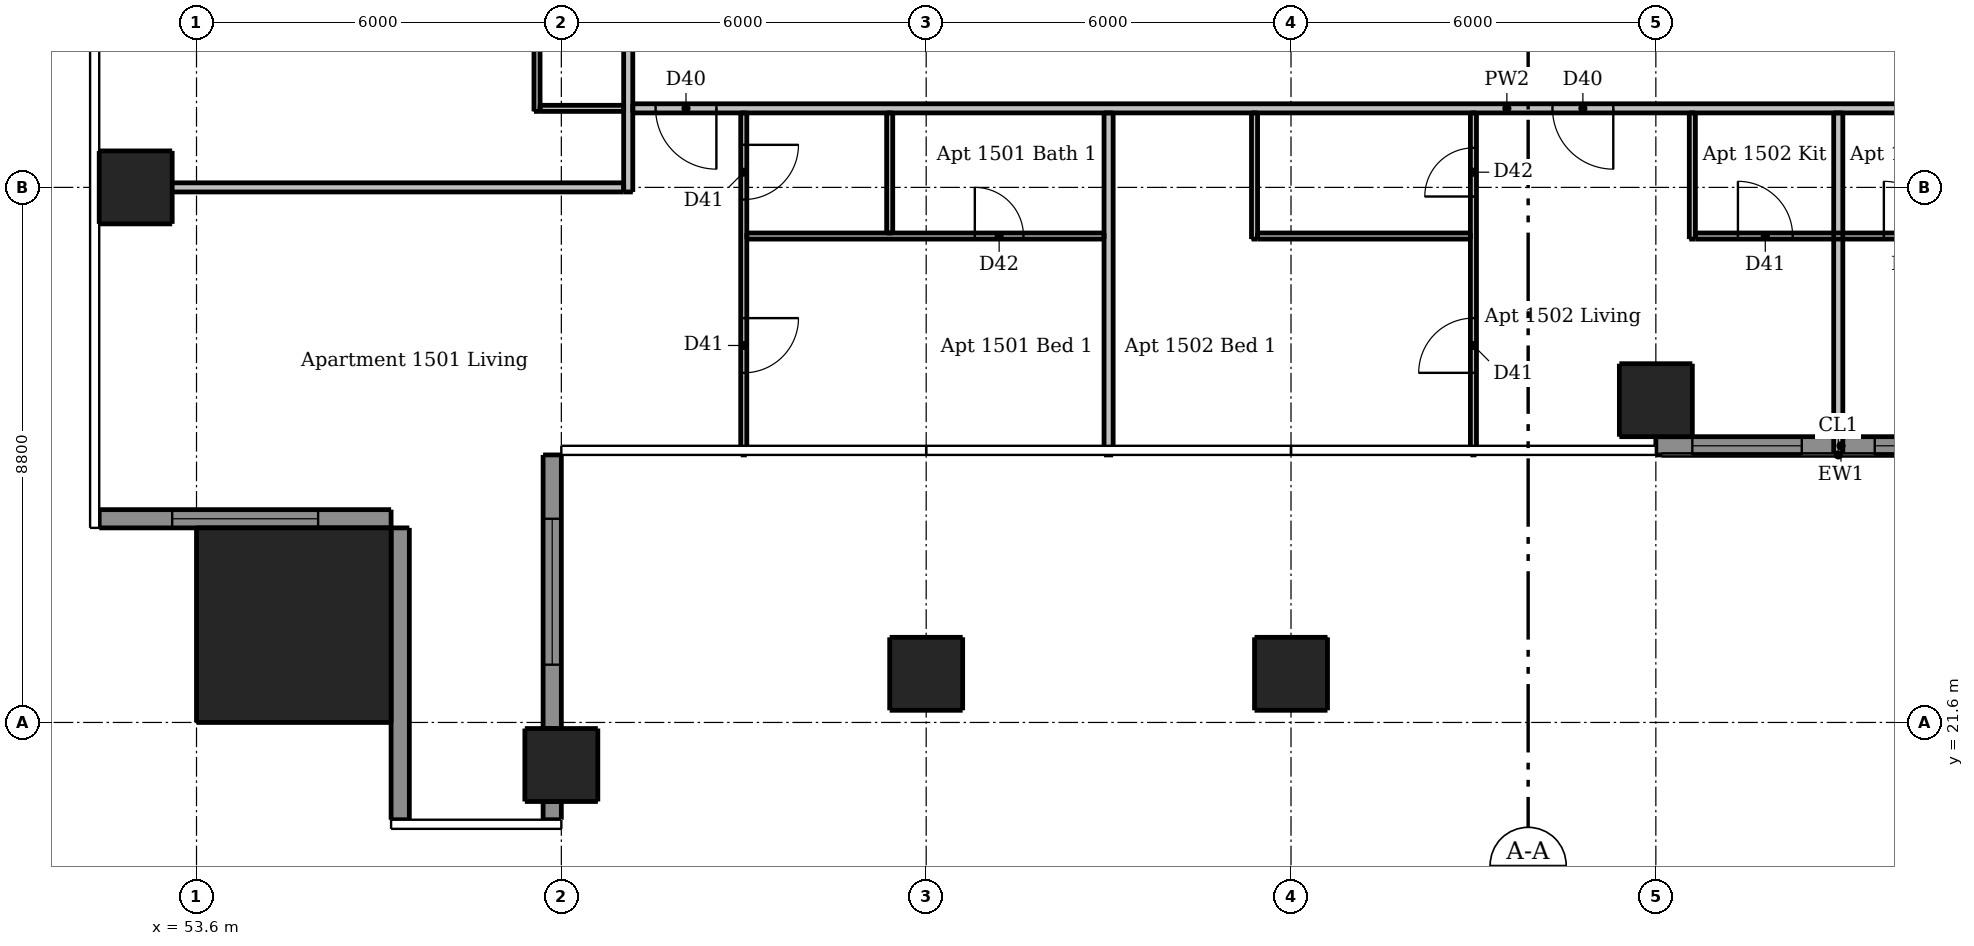
"""IFC4 building model, lengths in metres.
Left out: names, types, materials, properties, quantities, classifications, styles, units other than length and angle.
Written with IfcOpenShell. Run it as: python <this file> out.ifc"""

import sys

from ifc_helpers import new_model, si_unit, direction, frame, frame_2d, origin, origin_2d, place, context, subcontext, project, spatial, rectangle, extrude, element, fill, save


model = new_model("IFC4")
c1 = context("Model", 3, precision=1e-05, world=origin(), true_north=direction((0.0, 1.0)))
c2 = subcontext(c1, "Body", "Model", "MODEL_VIEW")
j1 = project(units=[si_unit("LENGTHUNIT", "METRE"), si_unit("PLANEANGLEUNIT", "RADIAN")], contexts=[c1])
p1 = place(None, origin())
s1 = spatial("IfcSite", under=j1, at=p1, CompositionType="ELEMENT")
p2 = place(p1, origin())
s2 = spatial("IfcBuilding", under=s1, at=p2, CompositionType="ELEMENT")
p3 = place(p2, frame((0.0, 0.0, 56.5)))
s3 = spatial("IfcBuildingStorey", under=s2, at=p3, CompositionType="ELEMENT", Elevation=56.5)
for number, where, z_axis, x_axis in (
    (1, (59.6, 20.9, 0.0), (0.0, 0.0, 1.0), (1.0, 0.0, 0.0)),
    (2, (65.6, 22.4, 0.0), (0.0, 0.0, 1.0), (1.0, 0.0, 0.0)),
    (3, (71.6, 22.4, 0.0), (0.0, 0.0, 1.0), (1.0, 0.0, 0.0)),
    (4, (77.6, 26.9, 0.0), (0.0, 0.0, 1.0), (1.0, 0.0, 0.0)),
    (5, (52.6, 30.4, 0.0), (0.0, 0.0, 1.0), (1.0, 0.0, 0.0)),
):
    element("IfcColumn", number, at=place(p3, frame(where, z_axis=z_axis, x_axis=x_axis)), inside=s3, PredefinedType="COLUMN", context=c2, shape_type="SweptSolid", body=[
        extrude(rectangle(XDim=1.2, YDim=1.2, at=origin_2d()), origin(), (0.0, 0.0, 1.0), 3.05),
    ])
p4 = place(p3, frame((55.2, 23.2, 0.0), z_axis=(0.0, 0.0, 1.0), x_axis=(1.0, 0.0, 0.0)))
e6 = element("IfcColumn", 6, at=p4, inside=s3, PredefinedType="COLUMN", context=c2, shape_type="SweptSolid", body=[
    extrude(rectangle(XDim=3.2, YDim=3.2, at=origin_2d()), origin(), (0.0, 0.0, 1.0), 3.3),
])
p5 = place(p3, frame((59.45, 20.0, 0.0), z_axis=(0.0, 0.0, 1.0), x_axis=(0.0, 1.0, 0.0)))
e7 = element("IfcWall", 7, at=p5, inside=s3, PredefinedType="SOLIDWALL", context=c2, shape_type="SweptSolid", body=[
    extrude(rectangle(XDim=0.3, YDim=0.3, at=frame_2d((0.15, 0.0))), origin(), (0.0, 0.0, 1.0), 3.05),
])
p6 = place(p3, frame((59.45, 21.5, 0.0), z_axis=(0.0, 0.0, 1.0), x_axis=(0.0, 1.0, 0.0)))
e8 = element("IfcWall", 8, at=p6, inside=s3, PredefinedType="SOLIDWALL", context=c2, shape_type="SweptSolid", body=[
    extrude(rectangle(XDim=4.5, YDim=0.3, at=frame_2d((2.25, 0.0))), origin(), (0.0, 0.0, 1.0), 3.05),
])
p7 = place(p6, frame((1.05, 0.0, 0.15)))
e9 = element("IfcOpeningElement", 9, at=p7, cuts=e8, PredefinedType="OPENING", context=c2, shape_type="SweptSolid", body=[
    extrude(rectangle(XDim=2.4, YDim=2.1, at=frame_2d((1.2, 1.05))), frame((0.0, 0.16, 0.0), z_axis=(0.0, -1.0, 0.0), x_axis=(1.0, 0.0, 0.0)), (0.0, 0.0, 1.0), 0.32),
])
p8 = place(p3, frame((52.0, 24.95, 0.0), z_axis=(0.0, 0.0, 1.0), x_axis=(1.0, 0.0, 0.0)))
e10 = element("IfcWall", 10, at=p8, inside=s3, PredefinedType="SOLIDWALL", context=c2, shape_type="SweptSolid", body=[
    extrude(rectangle(XDim=4.8, YDim=0.3, at=frame_2d((2.4, 0.0))), origin(), (0.0, 0.0, 1.0), 3.05),
])
p9 = place(p8, frame((1.2, 0.0, 0.15)))
e11 = element("IfcOpeningElement", 11, at=p9, cuts=e10, PredefinedType="OPENING", context=c2, shape_type="SweptSolid", body=[
    extrude(rectangle(XDim=2.4, YDim=2.1, at=frame_2d((1.2, 1.05))), frame((0.0, 0.16, 0.0), z_axis=(0.0, -1.0, 0.0), x_axis=(1.0, 0.0, 0.0)), (0.0, 0.0, 1.0), 0.32),
])
p10 = place(p3, frame((56.95, 24.8, 0.0), z_axis=(0.0, 0.0, 1.0), x_axis=(0.0, -1.0, 0.0)))
e12 = element("IfcWall", 12, at=p10, inside=s3, PredefinedType="SOLIDWALL", context=c2, shape_type="SweptSolid", body=[
    extrude(rectangle(XDim=4.8, YDim=0.3, at=frame_2d((2.4, 0.0))), origin(), (0.0, 0.0, 1.0), 3.05),
])
p11 = place(p3, frame((77.6, 26.15, 0.0), z_axis=(0.0, 0.0, 1.0), x_axis=(1.0, 0.0, 0.0)))
e13 = element("IfcWall", 13, at=p11, inside=s3, PredefinedType="SOLIDWALL", context=c2, shape_type="SweptSolid", body=[
    extrude(rectangle(XDim=6.09, YDim=0.3, at=frame_2d((3.045, 0.0))), origin(), (0.0, 0.0, 1.0), 3.05),
])
p12 = place(p11, frame((0.6, 0.0, 0.15)))
e14 = element("IfcOpeningElement", 14, at=p12, cuts=e13, PredefinedType="OPENING", context=c2, shape_type="SweptSolid", body=[
    extrude(rectangle(XDim=1.8, YDim=2.1, at=frame_2d((0.9, 1.05))), frame((0.0, 0.16, 0.0), z_axis=(0.0, -1.0, 0.0), x_axis=(1.0, 0.0, 0.0)), (0.0, 0.0, 1.0), 0.32),
])
p13 = place(p11, frame((3.6, 0.0, 0.15)))
e15 = element("IfcOpeningElement", 15, at=p13, cuts=e13, PredefinedType="OPENING", context=c2, shape_type="SweptSolid", body=[
    extrude(rectangle(XDim=1.8, YDim=2.1, at=frame_2d((0.9, 1.05))), frame((0.0, 0.16, 0.0), z_axis=(0.0, -1.0, 0.0), x_axis=(1.0, 0.0, 0.0)), (0.0, 0.0, 1.0), 0.32),
])
p14 = place(p3, frame((59.2, 31.65, 0.0), z_axis=(0.0, 0.0, 1.0), x_axis=(0.0, 1.0, 0.0)))
e16 = element("IfcWall", 16, at=p14, inside=s3, PredefinedType="PARTITIONING", context=c2, shape_type="SweptSolid", body=[
    extrude(rectangle(XDim=16.675, YDim=0.1, at=frame_2d((8.337, 0.0))), origin(), (0.0, 0.0, 1.0), 3.05),
])
p15 = place(p14, frame((3.45, 0.0, 0.0)))
e17 = element("IfcOpeningElement", 17, at=p15, cuts=e16, PredefinedType="OPENING", context=c2, shape_type="SweptSolid", body=[
    extrude(rectangle(XDim=0.9, YDim=2.1, at=frame_2d((0.45, 1.05))), frame((0.0, 0.06, 0.0), z_axis=(0.0, -1.0, 0.0), x_axis=(1.0, 0.0, 0.0)), (0.0, 0.0, 1.0), 0.12),
])
p16 = place(p14, frame((8.8, 0.0, 0.0)))
e18 = element("IfcOpeningElement", 18, at=p16, cuts=e16, PredefinedType="OPENING", context=c2, shape_type="SweptSolid", body=[
    extrude(rectangle(XDim=0.9, YDim=2.1, at=frame_2d((0.45, 1.05))), frame((0.0, 0.06, 0.0), z_axis=(0.0, -1.0, 0.0), x_axis=(1.0, 0.0, 0.0)), (0.0, 0.0, 1.0), 0.12),
])
p17 = place(p14, frame((14.5, 0.0, 0.0)))
e19 = element("IfcOpeningElement", 19, at=p17, cuts=e16, PredefinedType="OPENING", context=c2, shape_type="SweptSolid", body=[
    extrude(rectangle(XDim=0.9, YDim=2.1, at=frame_2d((0.45, 1.05))), frame((0.0, 0.06, 0.0), z_axis=(0.0, -1.0, 0.0), x_axis=(1.0, 0.0, 0.0)), (0.0, 0.0, 1.0), 0.12),
])
p18 = place(p14, frame((11.55, 0.0, 0.0)))
e20 = element("IfcOpeningElement", 20, at=p18, cuts=e16, PredefinedType="OPENING", context=c2, shape_type="SweptSolid", body=[
    extrude(rectangle(XDim=0.8, YDim=2.1, at=frame_2d((0.4, 1.05))), frame((0.0, 0.06, 0.0), z_axis=(0.0, -1.0, 0.0), x_axis=(1.0, 0.0, 0.0)), (0.0, 0.0, 1.0), 0.12),
])
p19 = place(p3, frame((62.6, 31.625, 0.0), z_axis=(0.0, 0.0, 1.0), x_axis=(0.0, -1.0, 0.0)))
e21 = element("IfcWall", 21, at=p19, inside=s3, PredefinedType="PARTITIONING", context=c2, shape_type="SweptSolid", body=[
    extrude(rectangle(XDim=5.625, YDim=0.1, at=frame_2d((2.812, 0.0))), origin(), (0.0, 0.0, 1.0), 3.05),
])
p20 = place(p19, frame((0.525, 0.0, 0.0)))
e22 = element("IfcOpeningElement", 22, at=p20, cuts=e21, PredefinedType="OPENING", context=c2, shape_type="SweptSolid", body=[
    extrude(rectangle(XDim=0.9, YDim=2.1, at=frame_2d((0.45, 1.05))), frame((0.0, 0.06, 0.0), z_axis=(0.0, -1.0, 0.0), x_axis=(1.0, 0.0, 0.0)), (0.0, 0.0, 1.0), 0.12),
])
p21 = place(p19, frame((3.375, 0.0, 0.0)))
e23 = element("IfcOpeningElement", 23, at=p21, cuts=e21, PredefinedType="OPENING", context=c2, shape_type="SweptSolid", body=[
    extrude(rectangle(XDim=0.9, YDim=2.1, at=frame_2d((0.45, 1.05))), frame((0.0, 0.06, 0.0), z_axis=(0.0, -1.0, 0.0), x_axis=(1.0, 0.0, 0.0)), (0.0, 0.0, 1.0), 0.12),
])
p22 = place(p3, frame((65.0, 29.65, 0.0), z_axis=(0.0, 0.0, 1.0), x_axis=(0.0, 1.0, 0.0)))
e24 = element("IfcWall", 24, at=p22, inside=s3, PredefinedType="PARTITIONING", context=c2, shape_type="SweptSolid", body=[
    extrude(rectangle(XDim=1.975, YDim=0.1, at=frame_2d((0.988, 0.0))), origin(), (0.0, 0.0, 1.0), 3.05),
])
p23 = place(p3, frame((71.0, 29.55, 0.0), z_axis=(0.0, 0.0, 1.0), x_axis=(0.0, 1.0, 0.0)))
e25 = element("IfcWall", 25, at=p23, inside=s3, PredefinedType="PARTITIONING", context=c2, shape_type="SweptSolid", body=[
    extrude(rectangle(XDim=2.075, YDim=0.1, at=frame_2d((1.038, 0.0))), origin(), (0.0, 0.0, 1.0), 3.05),
])
p24 = place(p3, frame((74.6, 26.0, 0.0), z_axis=(0.0, 0.0, 1.0), x_axis=(0.0, 1.0, 0.0)))
e26 = element("IfcWall", 26, at=p24, inside=s3, PredefinedType="PARTITIONING", context=c2, shape_type="SweptSolid", body=[
    extrude(rectangle(XDim=5.625, YDim=0.1, at=frame_2d((2.812, 0.0))), origin(), (0.0, 0.0, 1.0), 3.05),
])
p25 = place(p24, frame((1.35, 0.0, 0.0)))
e27 = element("IfcOpeningElement", 27, at=p25, cuts=e26, PredefinedType="OPENING", context=c2, shape_type="SweptSolid", body=[
    extrude(rectangle(XDim=0.9, YDim=2.1, at=frame_2d((0.45, 1.05))), frame((0.0, 0.06, 0.0), z_axis=(0.0, -1.0, 0.0), x_axis=(1.0, 0.0, 0.0)), (0.0, 0.0, 1.0), 0.12),
])
p26 = place(p24, frame((4.25, 0.0, 0.0)))
e28 = element("IfcOpeningElement", 28, at=p26, cuts=e26, PredefinedType="OPENING", context=c2, shape_type="SweptSolid", body=[
    extrude(rectangle(XDim=0.8, YDim=2.1, at=frame_2d((0.4, 1.05))), frame((0.0, 0.06, 0.0), z_axis=(0.0, -1.0, 0.0), x_axis=(1.0, 0.0, 0.0)), (0.0, 0.0, 1.0), 0.12),
])
p27 = place(p3, frame((78.2, 29.55, 0.0), z_axis=(0.0, 0.0, 1.0), x_axis=(0.0, 1.0, 0.0)))
e29 = element("IfcWall", 29, at=p27, inside=s3, PredefinedType="PARTITIONING", context=c2, shape_type="SweptSolid", body=[
    extrude(rectangle(XDim=2.075, YDim=0.1, at=frame_2d((1.038, 0.0))), origin(), (0.0, 0.0, 1.0), 3.05),
])
p28 = place(p3, frame((59.25, 31.7, 0.0), z_axis=(0.0, 0.0, 1.0), x_axis=(1.0, 0.0, 0.0)))
e30 = element("IfcWall", 30, at=p28, inside=s3, PredefinedType="PARTITIONING", context=c2, shape_type="SweptSolid", body=[
    extrude(rectangle(XDim=1.375, YDim=0.1, at=frame_2d((0.688, 0.0))), origin(), (0.0, 0.0, 1.0), 3.05),
])
p29 = place(p3, frame((62.65, 29.6, 0.0), z_axis=(0.0, 0.0, 1.0), x_axis=(1.0, 0.0, 0.0)))
e31 = element("IfcWall", 31, at=p29, inside=s3, PredefinedType="PARTITIONING", context=c2, shape_type="SweptSolid", body=[
    extrude(rectangle(XDim=5.875, YDim=0.1, at=frame_2d((2.938, 0.0))), origin(), (0.0, 0.0, 1.0), 3.05),
])
p30 = place(p29, frame((3.75, 0.0, 0.0)))
e32 = element("IfcOpeningElement", 32, at=p30, cuts=e31, PredefinedType="OPENING", context=c2, shape_type="SweptSolid", body=[
    extrude(rectangle(XDim=0.8, YDim=2.1, at=frame_2d((0.4, 1.05))), frame((0.0, 0.06, 0.0), z_axis=(0.0, -1.0, 0.0), x_axis=(1.0, 0.0, 0.0)), (0.0, 0.0, 1.0), 0.12),
])
p31 = place(p3, frame((71.05, 29.6, 0.0), z_axis=(0.0, 0.0, 1.0), x_axis=(1.0, 0.0, 0.0)))
e33 = element("IfcWall", 33, at=p31, inside=s3, PredefinedType="PARTITIONING", context=c2, shape_type="SweptSolid", body=[
    extrude(rectangle(XDim=3.5, YDim=0.1, at=frame_2d((1.75, 0.0))), origin(), (0.0, 0.0, 1.0), 3.05),
])
p32 = place(p3, frame((78.25, 29.6, 0.0), z_axis=(0.0, 0.0, 1.0), x_axis=(1.0, 0.0, 0.0)))
e34 = element("IfcWall", 34, at=p32, inside=s3, PredefinedType="PARTITIONING", context=c2, shape_type="SweptSolid", body=[
    extrude(rectangle(XDim=4.7, YDim=0.1, at=frame_2d((2.35, 0.0))), origin(), (0.0, 0.0, 1.0), 3.05),
])
p33 = place(p32, frame((0.7, 0.0, 0.0)))
e35 = element("IfcOpeningElement", 35, at=p33, cuts=e34, PredefinedType="OPENING", context=c2, shape_type="SweptSolid", body=[
    extrude(rectangle(XDim=0.9, YDim=2.1, at=frame_2d((0.45, 1.05))), frame((0.0, 0.06, 0.0), z_axis=(0.0, -1.0, 0.0), x_axis=(1.0, 0.0, 0.0)), (0.0, 0.0, 1.0), 0.12),
])
p34 = place(p32, frame((3.1, 0.0, 0.0)))
e36 = element("IfcOpeningElement", 36, at=p34, cuts=e34, PredefinedType="OPENING", context=c2, shape_type="SweptSolid", body=[
    extrude(rectangle(XDim=0.9, YDim=2.1, at=frame_2d((0.45, 1.05))), frame((0.0, 0.06, 0.0), z_axis=(0.0, -1.0, 0.0), x_axis=(1.0, 0.0, 0.0)), (0.0, 0.0, 1.0), 0.12),
])
p35 = place(p3, frame((60.7, 30.325, 0.0), z_axis=(0.0, 0.0, 1.0), x_axis=(0.0, 1.0, 0.0)))
e37 = element("IfcWall", 37, at=p35, inside=s3, PredefinedType="PARTITIONING", context=c2, shape_type="SweptSolid", body=[
    extrude(rectangle(XDim=28.9, YDim=0.15, at=frame_2d((14.45, 0.0))), origin(), (0.0, 0.0, 1.0), 3.05),
])
p36 = place(p35, frame((9.225, 0.0, 0.0)))
e38 = element("IfcOpeningElement", 38, at=p36, cuts=e37, PredefinedType="OPENING", context=c2, shape_type="SweptSolid", body=[
    extrude(rectangle(XDim=1.0, YDim=2.1, at=frame_2d((0.5, 1.05))), frame((0.0, 0.085, 0.0), z_axis=(0.0, -1.0, 0.0), x_axis=(1.0, 0.0, 0.0)), (0.0, 0.0, 1.0), 0.17),
])
p37 = place(p35, frame((26.025, 0.0, 0.0)))
e39 = element("IfcOpeningElement", 39, at=p37, cuts=e37, PredefinedType="OPENING", context=c2, shape_type="SweptSolid", body=[
    extrude(rectangle(XDim=1.0, YDim=2.1, at=frame_2d((0.5, 1.05))), frame((0.0, 0.085, 0.0), z_axis=(0.0, -1.0, 0.0), x_axis=(1.0, 0.0, 0.0)), (0.0, 0.0, 1.0), 0.17),
])
for number, where, z_axis, x_axis in (
    (40, (68.6, 26.0, 0.0), (0.0, 0.0, 1.0), (0.0, 1.0, 0.0)),
    (41, (80.6, 26.0, 0.0), (0.0, 0.0, 1.0), (0.0, 1.0, 0.0)),
):
    element("IfcWall", number, at=place(p3, frame(where, z_axis=z_axis, x_axis=x_axis)), inside=s3, PredefinedType="PARTITIONING", context=c2, shape_type="SweptSolid", body=[
        extrude(rectangle(XDim=5.625, YDim=0.15, at=frame_2d((2.812, 0.0))), origin(), (0.0, 0.0, 1.0), 3.05),
    ])
p38 = place(p3, frame((89.525, 31.7, 0.0), z_axis=(0.0, 0.0, 1.0), x_axis=(-1.0, 0.0, 0.0)))
e42 = element("IfcWall", 42, at=p38, inside=s3, PredefinedType="PARTITIONING", context=c2, shape_type="SweptSolid", body=[
    extrude(rectangle(XDim=28.75, YDim=0.15, at=frame_2d((14.375, 0.0))), origin(), (0.0, 0.0, 1.0), 3.05),
])
p39 = place(p38, frame((27.375, 0.0, 0.0)))
e43 = element("IfcOpeningElement", 43, at=p39, cuts=e42, PredefinedType="OPENING", context=c2, shape_type="SweptSolid", body=[
    extrude(rectangle(XDim=1.0, YDim=2.1, at=frame_2d((0.5, 1.05))), frame((0.0, 0.085, 0.0), z_axis=(0.0, -1.0, 0.0), x_axis=(1.0, 0.0, 0.0)), (0.0, 0.0, 1.0), 0.17),
])
p40 = place(p38, frame((12.625, 0.0, 0.0)))
e44 = element("IfcOpeningElement", 44, at=p40, cuts=e42, PredefinedType="OPENING", context=c2, shape_type="SweptSolid", body=[
    extrude(rectangle(XDim=1.0, YDim=2.1, at=frame_2d((0.5, 1.05))), frame((0.0, 0.085, 0.0), z_axis=(0.0, -1.0, 0.0), x_axis=(1.0, 0.0, 0.0)), (0.0, 0.0, 1.0), 0.17),
])
p41 = place(p38, frame((4.225, 0.0, 0.0)))
e45 = element("IfcOpeningElement", 45, at=p41, cuts=e42, PredefinedType="OPENING", context=c2, shape_type="SweptSolid", body=[
    extrude(rectangle(XDim=1.0, YDim=2.1, at=frame_2d((0.5, 1.05))), frame((0.0, 0.085, 0.0), z_axis=(0.0, -1.0, 0.0), x_axis=(1.0, 0.0, 0.0)), (0.0, 0.0, 1.0), 0.17),
])
p42 = place(p3, frame((52.0, 30.4, 0.0), z_axis=(0.0, 0.0, 1.0), x_axis=(1.0, 0.0, 0.0)))
e46 = element("IfcWall", 46, at=p42, inside=s3, PredefinedType="PARTITIONING", context=c2, shape_type="SweptSolid", body=[
    extrude(rectangle(XDim=8.625, YDim=0.15, at=frame_2d((4.312, 0.0))), origin(), (0.0, 0.0, 1.0), 2.647),
])
p43 = place(p7, origin())
e47 = element("IfcWindow", 47, at=p43, inside=s3, PartitioningType="DOUBLE_PANEL_VERTICAL", PredefinedType="WINDOW", context=c2, shape_type="SweptSolid", body=[
    extrude(rectangle(XDim=2.4, YDim=2.1, at=frame_2d((1.2, 1.05))), frame((0.0, 0.03, 0.0), z_axis=(0.0, -1.0, 0.0), x_axis=(1.0, 0.0, 0.0)), (0.0, 0.0, 1.0), 0.06),
])
fill(e9, e47)
p44 = place(p9, origin())
e48 = element("IfcWindow", 48, at=p44, inside=s3, PartitioningType="DOUBLE_PANEL_VERTICAL", PredefinedType="WINDOW", context=c2, shape_type="SweptSolid", body=[
    extrude(rectangle(XDim=2.4, YDim=2.1, at=frame_2d((1.2, 1.05))), frame((0.0, 0.03, 0.0), z_axis=(0.0, -1.0, 0.0), x_axis=(1.0, 0.0, 0.0)), (0.0, 0.0, 1.0), 0.06),
])
fill(e11, e48)
p45 = place(p12, origin())
e49 = element("IfcWindow", 49, at=p45, inside=s3, PartitioningType="DOUBLE_PANEL_VERTICAL", PredefinedType="WINDOW", context=c2, shape_type="SweptSolid", body=[
    extrude(rectangle(XDim=1.8, YDim=2.1, at=frame_2d((0.9, 1.05))), frame((0.0, 0.03, 0.0), z_axis=(0.0, -1.0, 0.0), x_axis=(1.0, 0.0, 0.0)), (0.0, 0.0, 1.0), 0.06),
])
fill(e14, e49)
p46 = place(p13, origin())
e50 = element("IfcWindow", 50, at=p46, inside=s3, PartitioningType="DOUBLE_PANEL_VERTICAL", PredefinedType="WINDOW", context=c2, shape_type="SweptSolid", body=[
    extrude(rectangle(XDim=1.8, YDim=2.1, at=frame_2d((0.9, 1.05))), frame((0.0, 0.03, 0.0), z_axis=(0.0, -1.0, 0.0), x_axis=(1.0, 0.0, 0.0)), (0.0, 0.0, 1.0), 0.06),
])
fill(e15, e50)
p47 = place(p39, origin())
e51 = element("IfcDoor", 51, at=p47, inside=s3, OperationType="SINGLE_SWING_LEFT", PredefinedType="DOOR", context=c2, shape_type="SweptSolid", body=[
    extrude(rectangle(XDim=1.0, YDim=2.1, at=frame_2d((0.5, 1.05))), frame((0.0, 0.025, 0.0), z_axis=(0.0, -1.0, 0.0), x_axis=(1.0, 0.0, 0.0)), (0.0, 0.0, 1.0), 0.05),
])
fill(e43, e51)
p48 = place(p20, origin())
e52 = element("IfcDoor", 52, at=p48, inside=s3, OperationType="SINGLE_SWING_LEFT", PredefinedType="DOOR", context=c2, shape_type="SweptSolid", body=[
    extrude(rectangle(XDim=0.9, YDim=2.1, at=frame_2d((0.45, 1.05))), frame((0.0, 0.025, 0.0), z_axis=(0.0, -1.0, 0.0), x_axis=(1.0, 0.0, 0.0)), (0.0, 0.0, 1.0), 0.05),
])
fill(e22, e52)
p49 = place(p21, origin())
e53 = element("IfcDoor", 53, at=p49, inside=s3, OperationType="SINGLE_SWING_LEFT", PredefinedType="DOOR", context=c2, shape_type="SweptSolid", body=[
    extrude(rectangle(XDim=0.9, YDim=2.1, at=frame_2d((0.45, 1.05))), frame((0.0, 0.025, 0.0), z_axis=(0.0, -1.0, 0.0), x_axis=(1.0, 0.0, 0.0)), (0.0, 0.0, 1.0), 0.05),
])
fill(e23, e53)
p50 = place(p30, origin())
e54 = element("IfcDoor", 54, at=p50, inside=s3, OperationType="SINGLE_SWING_LEFT", PredefinedType="DOOR", context=c2, shape_type="SweptSolid", body=[
    extrude(rectangle(XDim=0.8, YDim=2.1, at=frame_2d((0.4, 1.05))), frame((0.0, 0.025, 0.0), z_axis=(0.0, -1.0, 0.0), x_axis=(1.0, 0.0, 0.0)), (0.0, 0.0, 1.0), 0.05),
])
fill(e32, e54)
p51 = place(p40, origin())
e55 = element("IfcDoor", 55, at=p51, inside=s3, OperationType="SINGLE_SWING_LEFT", PredefinedType="DOOR", context=c2, shape_type="SweptSolid", body=[
    extrude(rectangle(XDim=1.0, YDim=2.1, at=frame_2d((0.5, 1.05))), frame((0.0, 0.025, 0.0), z_axis=(0.0, -1.0, 0.0), x_axis=(1.0, 0.0, 0.0)), (0.0, 0.0, 1.0), 0.05),
])
fill(e44, e55)
p52 = place(p33, origin())
e56 = element("IfcDoor", 56, at=p52, inside=s3, OperationType="SINGLE_SWING_LEFT", PredefinedType="DOOR", context=c2, shape_type="SweptSolid", body=[
    extrude(rectangle(XDim=0.9, YDim=2.1, at=frame_2d((0.45, 1.05))), frame((0.0, 0.025, 0.0), z_axis=(0.0, -1.0, 0.0), x_axis=(1.0, 0.0, 0.0)), (0.0, 0.0, 1.0), 0.05),
])
fill(e35, e56)
p53 = place(p25, origin())
e57 = element("IfcDoor", 57, at=p53, inside=s3, OperationType="SINGLE_SWING_LEFT", PredefinedType="DOOR", context=c2, shape_type="SweptSolid", body=[
    extrude(rectangle(XDim=0.9, YDim=2.1, at=frame_2d((0.45, 1.05))), frame((0.0, 0.025, 0.0), z_axis=(0.0, -1.0, 0.0), x_axis=(1.0, 0.0, 0.0)), (0.0, 0.0, 1.0), 0.05),
])
fill(e27, e57)
p54 = place(p26, origin())
e58 = element("IfcDoor", 58, at=p54, inside=s3, OperationType="SINGLE_SWING_LEFT", PredefinedType="DOOR", context=c2, shape_type="SweptSolid", body=[
    extrude(rectangle(XDim=0.8, YDim=2.1, at=frame_2d((0.4, 1.05))), frame((0.0, 0.025, 0.0), z_axis=(0.0, -1.0, 0.0), x_axis=(1.0, 0.0, 0.0)), (0.0, 0.0, 1.0), 0.05),
])
fill(e28, e58)
p55 = place(p34, origin())
e59 = element("IfcDoor", 59, at=p55, inside=s3, OperationType="SINGLE_SWING_LEFT", PredefinedType="DOOR", context=c2, shape_type="SweptSolid", body=[
    extrude(rectangle(XDim=0.9, YDim=2.1, at=frame_2d((0.45, 1.05))), frame((0.0, 0.025, 0.0), z_axis=(0.0, -1.0, 0.0), x_axis=(1.0, 0.0, 0.0)), (0.0, 0.0, 1.0), 0.05),
])
fill(e36, e59)
save(model, sys.argv[1])
